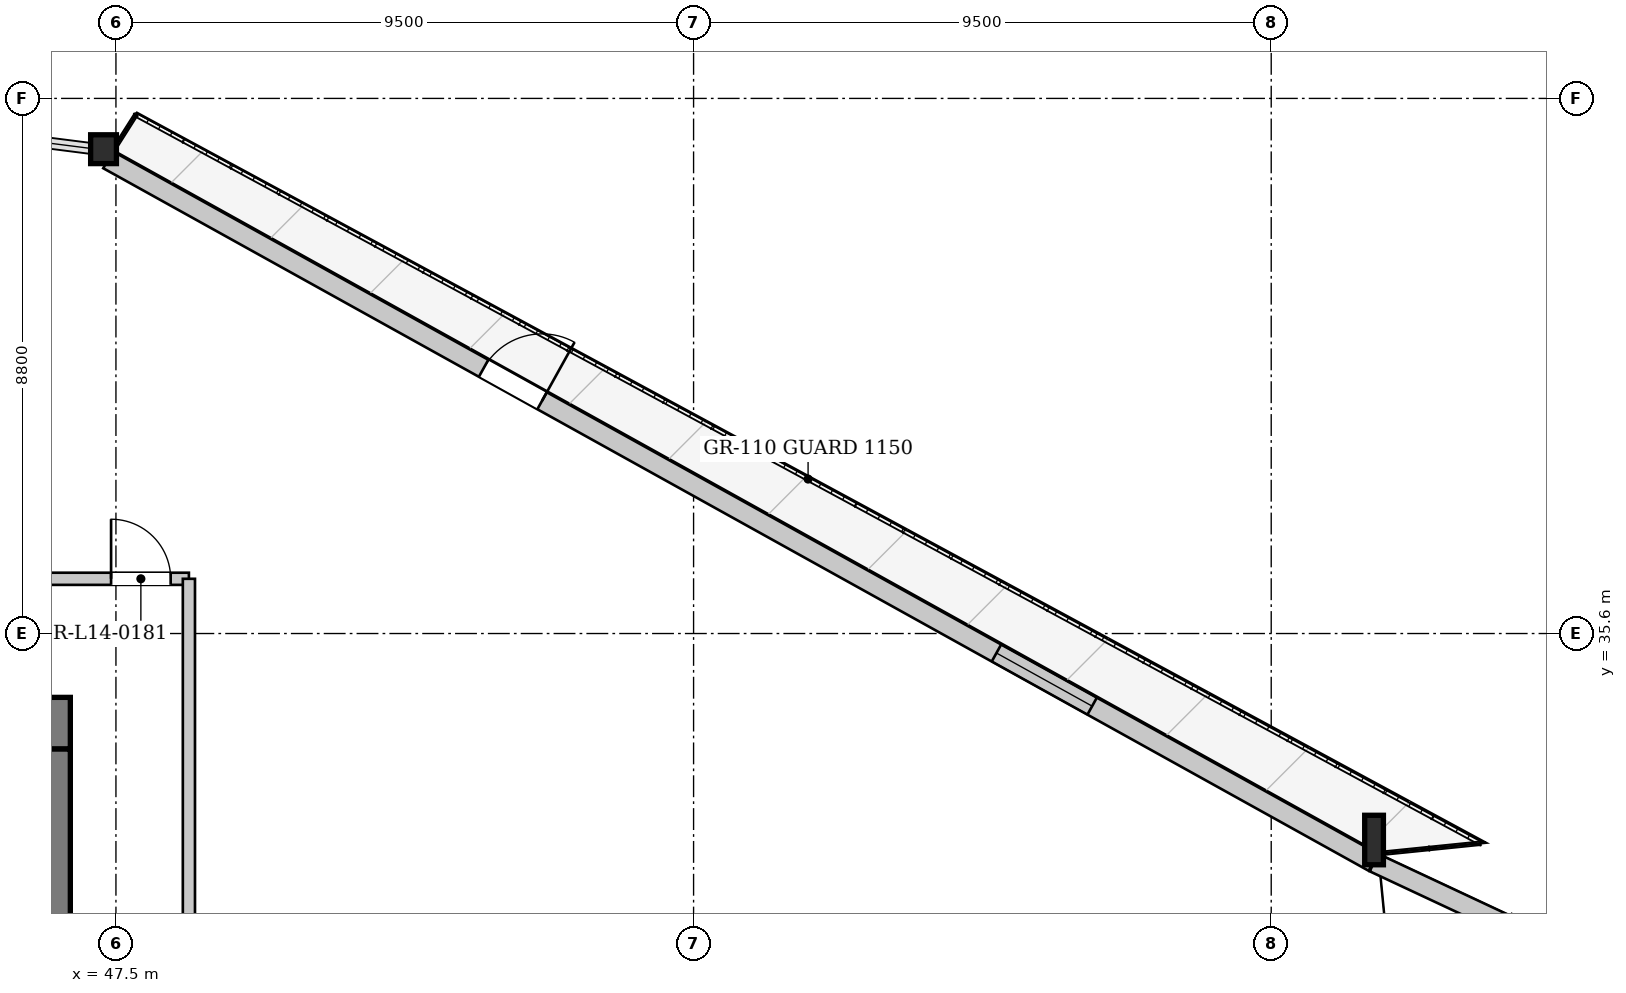
"""IFC4 building model, lengths in metres.
Left out: names, types, materials, properties, quantities, classifications, styles, units other than length and angle.
Written with IfcOpenShell. Run it as: python <this file> out.ifc"""

import sys

from ifc_helpers import new_model, si_unit, direction, frame, frame_2d, origin, origin_2d, place, context, subcontext, project, spatial, rectangle, i_section, extrude, source, transform, mapped, element, fill, save


model = new_model("IFC4")
c1 = context("Model", 3, precision=1e-05, world=origin(), true_north=direction((0.0, 1.0)))
c2 = subcontext(c1, "Body", "Model", "MODEL_VIEW")
j1 = project(units=[si_unit("LENGTHUNIT", "METRE"), si_unit("PLANEANGLEUNIT", "RADIAN")], contexts=[c1])
p1 = place(None, origin())
s1 = spatial("IfcSite", under=j1, at=p1, CompositionType="ELEMENT")
p2 = place(p1, origin())
s2 = spatial("IfcBuilding", under=s1, at=p2, CompositionType="ELEMENT")
p3 = place(p2, frame((0.0, 0.0, 57.7)))
s3 = spatial("IfcBuildingStorey", under=s2, at=p3, CompositionType="ELEMENT", Elevation=57.7)
m1 = source(origin(), c2, "Body", "SweptSolid", [
    extrude(i_section(OverallWidth=0.308, OverallDepth=0.814, WebThickness=0.021, FlangeThickness=0.04, at=origin_2d()), origin(), (0.0, 0.0, 1.0), 3.417),
])
p4 = place(p3, frame((68.256, 31.979, 0.0), z_axis=(-0.038007603736, 0.13174064152, 0.990555311646), x_axis=(-0.960812916896, -0.277197652814, 0.0)))
e1 = element("IfcColumn", 1, at=p4, inside=s3, PredefinedType="COLUMN", context=c2, shape_type="MappedRepresentation", body=[
    mapped(m1, transform((0.0, 0.0, 0.0), x_axis=(1.0, 0.0, 0.0), y_axis=(0.0, 1.0, 0.0), z_axis=(0.0, 0.0, 1.0), scale=1.0)),
])
m2 = source(origin(), c2, "Body", "SweptSolid", [
    extrude(i_section(OverallWidth=0.424, OverallDepth=0.474, WebThickness=0.043, FlangeThickness=0.068, at=origin_2d()), origin(), (0.0, 0.0, 1.0), 3.399),
])
p5 = place(p3, frame((47.447, 43.531, 0.0), z_axis=(-0.088704881702, 0.019608447534, 0.995864926959), x_axis=(-0.215842043801, -0.976428293387, 0.0)))
e2 = element("IfcColumn", 2, at=p5, inside=s3, PredefinedType="COLUMN", context=c2, shape_type="MappedRepresentation", body=[
    mapped(m2, transform((0.0, 0.0, 0.0), x_axis=(1.0, 0.0, 0.0), y_axis=(0.0, 1.0, 0.0), z_axis=(0.0, 0.0, 1.0), scale=1.0)),
])
p6 = place(p3, frame((47.369, 43.392, 0.0), z_axis=(0.0, 0.0, 1.0), x_axis=(0.874309158842, -0.485369441524, 0.0)))
e3 = element("IfcWall", 3, at=p6, inside=s3, PredefinedType="SOLIDWALL", context=c2, shape_type="SweptSolid", body=[
    extrude(rectangle(XDim=23.802, YDim=0.32, at=frame_2d((11.901, 0.0))), origin(), (0.0, 0.0, 1.0), 2.592),
])
p7 = place(p6, frame((7.066, 0.0, 0.0)))
e4 = element("IfcOpeningElement", 4, at=p7, cuts=e3, PredefinedType="OPENING", context=c2, shape_type="SweptSolid", body=[
    extrude(rectangle(XDim=1.1, YDim=2.3, at=frame_2d((0.55, 1.15))), frame((0.0, 0.17, 0.0), z_axis=(0.0, -1.0, 0.0), x_axis=(1.0, 0.0, 0.0)), (0.0, 0.0, 1.0), 0.34),
])
p8 = place(p6, frame((16.713, 0.0, 0.272)))
e5 = element("IfcOpeningElement", 5, at=p8, cuts=e3, PredefinedType="OPENING", context=c2, shape_type="SweptSolid", body=[
    extrude(rectangle(XDim=1.8, YDim=2.2, at=frame_2d((0.9, 1.1))), frame((0.0, 0.17, 0.0), z_axis=(0.0, -1.0, 0.0), x_axis=(1.0, 0.0, 0.0)), (0.0, 0.0, 1.0), 0.34),
])
p9 = place(p3, frame((68.188, 31.834, 0.0), z_axis=(0.0, 0.0, 1.0), x_axis=(0.905643487547, -0.424039943241, 0.0)))
e6 = element("IfcWall", 6, at=p9, inside=s3, PredefinedType="SOLIDWALL", context=c2, shape_type="SweptSolid", body=[
    extrude(rectangle(XDim=2.731, YDim=0.32, at=frame_2d((1.366, 0.0))), origin(), (0.0, 0.0, 1.0), 2.592),
])
p10 = place(p3, frame((29.25, 34.125, 0.0), z_axis=(0.0, 0.0, 1.0), x_axis=(1.0, 0.0, 0.0)))
e7 = element("IfcWall", 7, at=p10, inside=s3, PredefinedType="SHEAR", context=c2, shape_type="SweptSolid", body=[
    extrude(rectangle(XDim=17.5, YDim=0.85, at=frame_2d((8.75, 0.0))), origin(), (0.0, 0.0, 1.0), 3.3),
])
p11 = place(p10, frame((1.85, 0.0, 0.0)))
e8 = element("IfcOpeningElement", 8, at=p11, cuts=e7, PredefinedType="OPENING", context=c2, shape_type="SweptSolid", body=[
    extrude(rectangle(XDim=0.95, YDim=2.1, at=frame_2d((0.475, 1.05))), frame((0.0, 0.435, 0.0), z_axis=(0.0, -1.0, 0.0), x_axis=(1.0, 0.0, 0.0)), (0.0, 0.0, 1.0), 0.87),
])
p12 = place(p10, frame((4.23, 0.0, 0.0)))
e9 = element("IfcOpeningElement", 9, at=p12, cuts=e7, PredefinedType="OPENING", context=c2, shape_type="SweptSolid", body=[
    extrude(rectangle(XDim=1.32, YDim=2.2, at=frame_2d((0.66, 1.1))), frame((0.0, 0.435, 0.0), z_axis=(0.0, -1.0, 0.0), x_axis=(1.0, 0.0, 0.0)), (0.0, 0.0, 1.0), 0.87),
])
p13 = place(p10, frame((15.3, 0.0, 0.0)))
e10 = element("IfcOpeningElement", 10, at=p13, cuts=e7, PredefinedType="OPENING", context=c2, shape_type="SweptSolid", body=[
    extrude(rectangle(XDim=0.95, YDim=2.1, at=frame_2d((0.475, 1.05))), frame((0.0, 0.435, 0.0), z_axis=(0.0, -1.0, 0.0), x_axis=(1.0, 0.0, 0.0)), (0.0, 0.0, 1.0), 0.87),
])
p14 = place(p3, frame((46.325, 33.7, 0.0), z_axis=(0.0, 0.0, 1.0), x_axis=(0.0, -1.0, 0.0)))
e11 = element("IfcWall", 11, at=p14, inside=s3, PredefinedType="SHEAR", context=c2, shape_type="SweptSolid", body=[
    extrude(rectangle(XDim=14.2, YDim=0.85, at=frame_2d((7.1, 0.0))), origin(), (0.0, 0.0, 1.0), 3.3),
])
p15 = place(p14, frame((5.18, 0.0, 0.0)))
e12 = element("IfcOpeningElement", 12, at=p15, cuts=e11, PredefinedType="OPENING", context=c2, shape_type="SweptSolid", body=[
    extrude(rectangle(XDim=1.6, YDim=2.2, at=frame_2d((0.8, 1.1))), frame((0.0, 0.435, 0.0), z_axis=(0.0, -1.0, 0.0), x_axis=(1.0, 0.0, 0.0)), (0.0, 0.0, 1.0), 0.87),
])
p16 = place(p3, frame((27.3, 36.5, 0.0), z_axis=(0.0, 0.0, 1.0), x_axis=(1.0, 0.0, 0.0)))
e13 = element("IfcWall", 13, at=p16, inside=s3, PredefinedType="PARTITIONING", context=c2, shape_type="SweptSolid", body=[
    extrude(rectangle(XDim=21.4, YDim=0.2, at=frame_2d((10.7, 0.0))), origin(), (0.0, 0.0, 1.0), 3.3),
])
p17 = place(p16, frame((20.12, 0.0, 0.0)))
e14 = element("IfcOpeningElement", 14, at=p17, cuts=e13, PredefinedType="OPENING", context=c2, shape_type="SweptSolid", body=[
    extrude(rectangle(XDim=0.98, YDim=2.15, at=frame_2d((0.49, 1.075))), frame((0.0, 0.11, 0.0), z_axis=(0.0, -1.0, 0.0), x_axis=(1.0, 0.0, 0.0)), (0.0, 0.0, 1.0), 0.22),
])
p18 = place(p16, frame((0.3, 0.0, 0.0)))
e15 = element("IfcOpeningElement", 15, at=p18, cuts=e13, PredefinedType="OPENING", context=c2, shape_type="SweptSolid", body=[
    extrude(rectangle(XDim=0.98, YDim=2.15, at=frame_2d((0.49, 1.075))), frame((0.0, 0.11, 0.0), z_axis=(0.0, -1.0, 0.0), x_axis=(1.0, 0.0, 0.0)), (0.0, 0.0, 1.0), 0.22),
])
p19 = place(p3, frame((48.7, 16.7, 0.0), z_axis=(0.0, 0.0, 1.0), x_axis=(0.0, 1.0, 0.0)))
e16 = element("IfcWall", 16, at=p19, inside=s3, PredefinedType="PARTITIONING", context=c2, shape_type="SweptSolid", body=[
    extrude(rectangle(XDim=19.8, YDim=0.2, at=frame_2d((9.9, 0.0))), origin(), (0.0, 0.0, 1.0), 3.3),
])
p20 = place(p19, frame((2.042, 0.0, 0.0)))
e17 = element("IfcOpeningElement", 17, at=p20, cuts=e16, PredefinedType="OPENING", context=c2, shape_type="SweptSolid", body=[
    extrude(rectangle(XDim=0.98, YDim=2.15, at=frame_2d((0.49, 1.075))), frame((0.0, 0.11, 0.0), z_axis=(0.0, -1.0, 0.0), x_axis=(1.0, 0.0, 0.0)), (0.0, 0.0, 1.0), 0.22),
])
m3 = source(origin(), c2, "Body", "SweptSolid", [
    extrude(rectangle(XDim=1.1, YDim=2.3, at=frame_2d((0.55, 1.15))), frame((0.0, 0.025, 0.0), z_axis=(0.0, -1.0, 0.0), x_axis=(1.0, 0.0, 0.0)), (0.0, 0.0, 1.0), 0.05),
])
p21 = place(p7, origin())
e18 = element("IfcDoor", 18, at=p21, inside=s3, OperationType="SINGLE_SWING_RIGHT", PredefinedType="DOOR", context=c2, shape_type="MappedRepresentation", body=[
    mapped(m3, transform((0.0, 0.0, 0.0), x_axis=(1.0, 0.0, 0.0), y_axis=(0.0, 1.0, 0.0), z_axis=(0.0, 0.0, 1.0), scale=1.0)),
])
fill(e4, e18)
m4 = source(origin(), c2, "Body", "SweptSolid", [
    extrude(rectangle(XDim=1.8, YDim=2.2, at=frame_2d((0.9, 1.1))), frame((0.0, 0.03, 0.0), z_axis=(0.0, -1.0, 0.0), x_axis=(1.0, 0.0, 0.0)), (0.0, 0.0, 1.0), 0.06),
])
p22 = place(p8, origin())
e19 = element("IfcWindow", 19, at=p22, inside=s3, PartitioningType="SINGLE_PANEL", PredefinedType="WINDOW", context=c2, shape_type="MappedRepresentation", body=[
    mapped(m4, transform((0.0, 0.0, 0.0), x_axis=(1.0, 0.0, 0.0), y_axis=(0.0, 1.0, 0.0), z_axis=(0.0, 0.0, 1.0), scale=1.0)),
])
fill(e5, e19)
m5 = source(origin(), c2, "Body", "SweptSolid", [
    extrude(rectangle(XDim=0.98, YDim=2.15, at=frame_2d((0.49, 1.075))), frame((0.0, 0.025, 0.0), z_axis=(0.0, -1.0, 0.0), x_axis=(1.0, 0.0, 0.0)), (0.0, 0.0, 1.0), 0.05),
])
p23 = place(p17, origin())
e20 = element("IfcDoor", 20, at=p23, inside=s3, OperationType="SINGLE_SWING_LEFT", PredefinedType="DOOR", context=c2, shape_type="MappedRepresentation", body=[
    mapped(m5, transform((0.0, 0.0, 0.0), x_axis=(1.0, 0.0, 0.0), y_axis=(0.0, 1.0, 0.0), z_axis=(0.0, 0.0, 1.0), scale=1.0)),
])
fill(e14, e20)
save(model, sys.argv[1])
